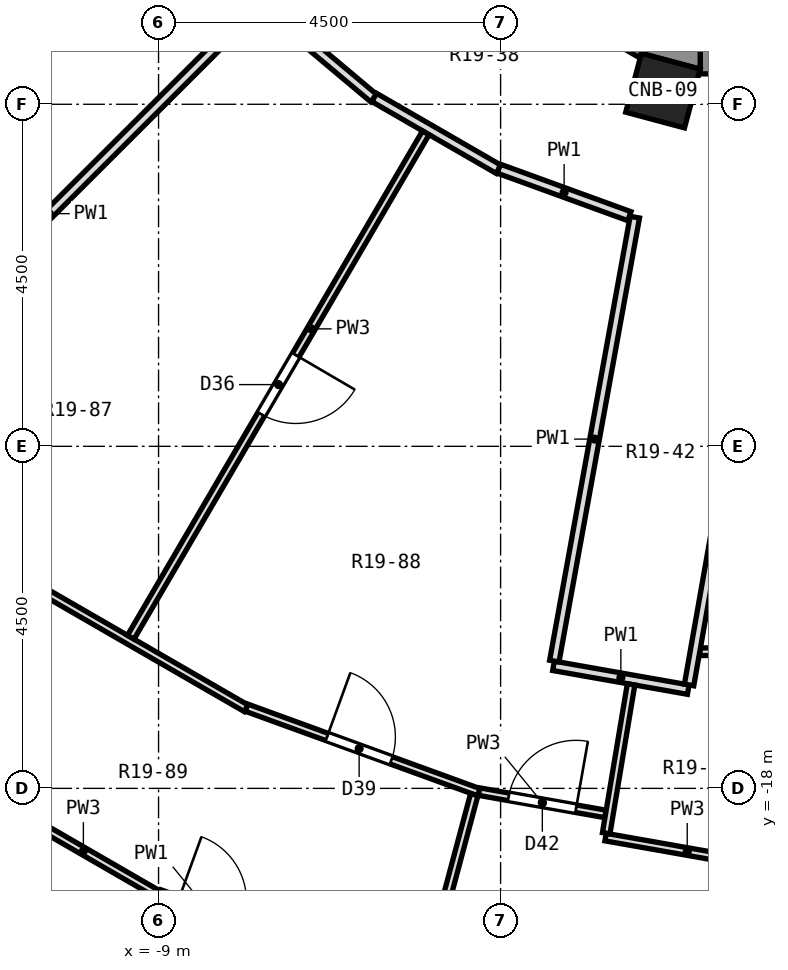
"""IFC4 building model, lengths in metres.
Left out: names, types, materials, properties, quantities, classifications, styles, units other than length and angle.
Written with IfcOpenShell. Run it as: python <this file> out.ifc"""

import sys

from ifc_helpers import new_model, si_unit, direction, frame, frame_2d, origin, origin_2d, place, context, subcontext, project, spatial, polyline, rectangle, outline, extrude, element, fill, save


model = new_model("IFC4")
c1 = context("Model", 3, precision=1e-05, world=origin(), true_north=direction((0.0, 1.0)))
c2 = subcontext(c1, "Body", "Model", "MODEL_VIEW")
j1 = project(units=[si_unit("LENGTHUNIT", "METRE"), si_unit("PLANEANGLEUNIT", "RADIAN")], contexts=[c1])
p1 = place(None, origin())
s1 = spatial("IfcSite", under=j1, at=p1, CompositionType="ELEMENT")
p2 = place(p1, origin())
s2 = spatial("IfcBuilding", under=s1, at=p2, CompositionType="ELEMENT")
p3 = place(p2, frame((0.0, 0.0, 111.7)))
s3 = spatial("IfcBuildingStorey", under=s2, at=p3, CompositionType="ELEMENT", Elevation=111.7)
p4 = place(p3, frame((-2.364, -8.821, 0.0), z_axis=(0.0, 0.0, 1.0), x_axis=(-0.258819045103, -0.965925826289, 0.0)))
e1 = element("IfcColumn", 1, at=p4, inside=s3, PredefinedType="COLUMN", context=c2, shape_type="SweptSolid", body=[
    extrude(rectangle(XDim=0.8, YDim=0.8, at=origin_2d()), origin(), (0.0, 0.0, 1.0), 3.3),
])
p5 = place(p3, frame((-5.773, -6.251, 0.0), z_axis=(0.0, 0.0, 1.0), x_axis=(0.86604563398, -0.499964958637, 0.0)))
e2 = element("IfcWall", 2, at=p5, inside=s3, PredefinedType="SOLIDWALL", context=c2, shape_type="SweptSolid", body=[
    extrude(rectangle(XDim=3.747, YDim=0.6, at=frame_2d((1.874, 0.0))), origin(), (0.0, 0.0, 1.0), 2.8),
])
p6 = place(p5, frame((0.674, 0.0, 0.9)))
e3 = element("IfcOpeningElement", 3, at=p6, cuts=e2, PredefinedType="OPENING", context=c2, shape_type="SweptSolid", body=[
    extrude(rectangle(XDim=2.4, YDim=1.8, at=frame_2d((1.2, 0.9))), frame((0.0, 0.312, 0.0), z_axis=(0.0, -1.0, 0.0), x_axis=(1.0, 0.0, 0.0)), (0.0, 0.0, 1.0), 0.624),
])
p7 = place(p3, frame((-1.874, -8.3, 0.0), z_axis=(0.0, 0.0, 1.0), x_axis=(1.0, 0.0, 0.0)))
e4 = element("IfcWall", 4, at=p7, inside=s3, PredefinedType="SOLIDWALL", context=c2, shape_type="SweptSolid", body=[
    extrude(rectangle(XDim=3.748, YDim=0.6, at=frame_2d((1.874, 0.0))), origin(), (0.0, 0.0, 1.0), 2.8),
])
p8 = place(p7, frame((0.674, 0.0, 0.9)))
e5 = element("IfcOpeningElement", 5, at=p8, cuts=e4, PredefinedType="OPENING", context=c2, shape_type="SweptSolid", body=[
    extrude(rectangle(XDim=2.4, YDim=1.8, at=frame_2d((1.2, 0.9))), frame((0.0, 0.312, 0.0), z_axis=(0.0, -1.0, 0.0), x_axis=(1.0, 0.0, 0.0)), (0.0, 0.0, 1.0), 0.624),
])
p9 = place(p3, origin())
e6 = element("IfcWall", 6, at=p9, inside=s3, PredefinedType="SOLIDWALL", context=c2, shape_type="SweptSolid", body=[
    extrude(outline(polyline([(-1.874, -8.538), (-1.874, -8.0), (-2.377, -7.865), (-2.646, -8.331), (-1.874, -8.538)])), origin(), (0.0, 0.0, 1.0), 2.8),
])
p10 = place(p3, frame((-7.665, -7.664, 0.0), z_axis=(0.0, 0.0, 1.0), x_axis=(0.766086332365, -0.642737684723, 0.0)))
e7 = element("IfcWall", 7, at=p10, inside=s3, PredefinedType="PARTITIONING", context=c2, shape_type="SweptSolid", body=[
    extrude(rectangle(XDim=1.954, YDim=0.125, at=frame_2d((0.977, 0.0))), origin(), (0.0, 0.0, 1.0), 2.8),
])
p11 = place(p3, frame((-10.987, -18.248, 0.0), z_axis=(0.0, 0.0, 1.0), x_axis=(0.865887497708, -0.500238784294, 0.0)))
e8 = element("IfcWall", 8, at=p11, inside=s3, PredefinedType="PARTITIONING", context=c2, shape_type="SweptSolid", body=[
    extrude(rectangle(XDim=2.305, YDim=0.1, at=frame_2d((1.153, 0.0))), origin(), (0.0, 0.0, 1.0), 2.8),
])
p12 = place(p3, frame((-10.666, -15.319, 0.0), z_axis=(0.0, 0.0, 1.0), x_axis=(0.866019502567, -0.500010221068, 0.0)))
e9 = element("IfcWall", 9, at=p12, inside=s3, PredefinedType="PARTITIONING", context=c2, shape_type="SweptSolid", body=[
    extrude(rectangle(XDim=3.256, YDim=0.1, at=frame_2d((1.628, 0.0))), origin(), (0.0, 0.0, 1.0), 2.8),
])
p13 = place(p3, frame((-6.163, -8.91, 0.0), z_axis=(0.0, 0.0, 1.0), x_axis=(0.865856369022, -0.500292662572, 0.0)))
e10 = element("IfcWall", 10, at=p13, inside=s3, PredefinedType="PARTITIONING", context=c2, shape_type="SweptSolid", body=[
    extrude(rectangle(XDim=1.89, YDim=0.125, at=frame_2d((0.945, 0.0))), origin(), (0.0, 0.0, 1.0), 2.8),
])
p14 = place(p3, frame((-8.988, -19.393, 0.0), z_axis=(0.0, 0.0, 1.0), x_axis=(0.939783394235, -0.341770642275, 0.0)))
e11 = element("IfcWall", 11, at=p14, inside=s3, PredefinedType="PARTITIONING", context=c2, shape_type="SweptSolid", body=[
    extrude(rectangle(XDim=1.422, YDim=0.125, at=frame_2d((0.711, 0.0))), origin(), (0.0, 0.0, 1.0), 2.8),
])
p15 = place(p14, frame((0.261, 0.0, 0.0)))
e12 = element("IfcOpeningElement", 12, at=p15, cuts=e11, PredefinedType="OPENING", context=c2, shape_type="SweptSolid", body=[
    extrude(rectangle(XDim=0.9, YDim=2.1, at=frame_2d((0.45, 1.05))), frame((0.0, 0.074, 0.0), z_axis=(0.0, -1.0, 0.0), x_axis=(1.0, 0.0, 0.0)), (0.0, 0.0, 1.0), 0.149),
])
p16 = place(p3, frame((-7.843, -16.938, 0.0), z_axis=(0.0, 0.0, 1.0), x_axis=(0.939697033511, -0.34200801922, 0.0)))
e13 = element("IfcWall", 13, at=p16, inside=s3, PredefinedType="PARTITIONING", context=c2, shape_type="SweptSolid", body=[
    extrude(rectangle(XDim=3.255, YDim=0.1, at=frame_2d((1.627, 0.0))), origin(), (0.0, 0.0, 1.0), 2.8),
])
p17 = place(p16, frame((1.127, 0.0, 0.0)))
e14 = element("IfcOpeningElement", 14, at=p17, cuts=e13, PredefinedType="OPENING", context=c2, shape_type="SweptSolid", body=[
    extrude(rectangle(XDim=0.9, YDim=2.1, at=frame_2d((0.45, 1.05))), frame((0.0, 0.062, 0.0), z_axis=(0.0, -1.0, 0.0), x_axis=(1.0, 0.0, 0.0)), (0.0, 0.0, 1.0), 0.124),
])
p18 = place(p3, frame((-4.523, -9.847, 0.0), z_axis=(0.0, 0.0, 1.0), x_axis=(0.939758316357, -0.341839592261, 0.0)))
e15 = element("IfcWall", 15, at=p18, inside=s3, PredefinedType="PARTITIONING", context=c2, shape_type="SweptSolid", body=[
    extrude(rectangle(XDim=1.828, YDim=0.125, at=frame_2d((0.914, 0.0))), origin(), (0.0, 0.0, 1.0), 2.8),
])
p19 = place(p3, frame((-3.119, -18.641, 0.0), z_axis=(0.0, 0.0, 1.0), x_axis=(0.984804954455, -0.173664048326, 0.0)))
e16 = element("IfcWall", 16, at=p19, inside=s3, PredefinedType="PARTITIONING", context=c2, shape_type="SweptSolid", body=[
    extrude(rectangle(XDim=2.182, YDim=0.1, at=frame_2d((1.091, 0.0))), origin(), (0.0, 0.0, 1.0), 2.8),
])
p20 = place(p3, frame((-4.783, -18.043, 0.0), z_axis=(0.0, 0.0, 1.0), x_axis=(0.98477046178, -0.173859534124, 0.0)))
e17 = element("IfcWall", 17, at=p20, inside=s3, PredefinedType="PARTITIONING", context=c2, shape_type="SweptSolid", body=[
    extrude(rectangle(XDim=1.689, YDim=0.1, at=frame_2d((0.845, 0.0))), origin(), (0.0, 0.0, 1.0), 2.8),
])
p21 = place(p20, frame((0.395, 0.0, 0.0)))
e18 = element("IfcOpeningElement", 18, at=p21, cuts=e17, PredefinedType="OPENING", context=c2, shape_type="SweptSolid", body=[
    extrude(rectangle(XDim=0.9, YDim=2.1, at=frame_2d((0.45, 1.05))), frame((0.0, 0.062, 0.0), z_axis=(0.0, -1.0, 0.0), x_axis=(1.0, 0.0, 0.0)), (0.0, 0.0, 1.0), 0.124),
])
p22 = place(p3, frame((-3.804, -16.388, 0.0), z_axis=(0.0, 0.0, 1.0), x_axis=(0.984772635564, -0.173847220985, 0.0)))
e19 = element("IfcWall", 19, at=p22, inside=s3, PredefinedType="PARTITIONING", context=c2, shape_type="SweptSolid", body=[
    extrude(rectangle(XDim=1.8, YDim=0.125, at=frame_2d((0.9, 0.0))), origin(), (0.0, 0.0, 1.0), 2.8),
])
p23 = place(p3, frame((-1.881, -16.202, 0.0), z_axis=(0.0, 0.0, 1.0), x_axis=(1.0, 0.0, 0.0)))
e20 = element("IfcWall", 20, at=p23, inside=s3, PredefinedType="PARTITIONING", context=c2, shape_type="SweptSolid", body=[
    extrude(rectangle(XDim=1.098, YDim=0.1, at=frame_2d((0.549, 0.0))), origin(), (0.0, 0.0, 1.0), 2.8),
])
p24 = place(p3, frame((-13.167, -13.166, 0.0), z_axis=(0.0, 0.0, 1.0), x_axis=(0.707391477554, 0.706821970148, 0.0)))
e21 = element("IfcWall", 21, at=p24, inside=s3, PredefinedType="PARTITIONING", context=c2, shape_type="SweptSolid", body=[
    extrude(rectangle(XDim=7.716, YDim=0.125, at=frame_2d((3.858, 0.0))), origin(), (0.0, 0.0, 1.0), 2.8),
])
p25 = place(p3, frame((-9.366, -16.012, 0.0), z_axis=(0.0, 0.0, 1.0), x_axis=(0.504907426376, 0.863173499819, 0.0)))
e22 = element("IfcWall", 22, at=p25, inside=s3, PredefinedType="PARTITIONING", context=c2, shape_type="SweptSolid", body=[
    extrude(rectangle(XDim=7.687, YDim=0.1, at=frame_2d((3.843, 0.0))), origin(), (0.0, 0.0, 1.0), 2.8),
])
p26 = place(p25, frame((3.4, 0.0, 0.0)))
e23 = element("IfcOpeningElement", 23, at=p26, cuts=e22, PredefinedType="OPENING", context=c2, shape_type="SweptSolid", body=[
    extrude(rectangle(XDim=0.9, YDim=2.1, at=frame_2d((0.45, 1.05))), frame((0.0, 0.062, 0.0), z_axis=(0.0, -1.0, 0.0), x_axis=(1.0, 0.0, 0.0)), (0.0, 0.0, 1.0), 0.124),
])
p27 = place(p3, frame((-6.642, -24.791, 0.0), z_axis=(0.0, 0.0, 1.0), x_axis=(0.258515851323, 0.966007015821, 0.0)))
e24 = element("IfcWall", 24, at=p27, inside=s3, PredefinedType="PARTITIONING", context=c2, shape_type="SweptSolid", body=[
    extrude(rectangle(XDim=6.945, YDim=0.1, at=frame_2d((3.473, 0.0))), origin(), (0.0, 0.0, 1.0), 2.8),
])
p28 = place(p3, frame((-3.793, -16.325, 0.0), z_axis=(0.0, 0.0, 1.0), x_axis=(0.178389527964, 0.983959946498, 0.0)))
e25 = element("IfcWall", 25, at=p28, inside=s3, PredefinedType="PARTITIONING", context=c2, shape_type="SweptSolid", body=[
    extrude(rectangle(XDim=5.936, YDim=0.125, at=frame_2d((2.968, 0.0))), origin(), (0.0, 0.0, 1.0), 2.8),
])
p29 = place(p3, frame((-2.02, -16.639, 0.0), z_axis=(0.0, 0.0, 1.0), x_axis=(0.17368681293, 0.984800939791, 0.0)))
e26 = element("IfcWall", 26, at=p29, inside=s3, PredefinedType="PARTITIONING", context=c2, shape_type="SweptSolid", body=[
    extrude(rectangle(XDim=5.938, YDim=0.125, at=frame_2d((2.969, 0.0))), origin(), (0.0, 0.0, 1.0), 2.8),
])
p30 = place(p3, frame((-3.111, -18.591, 0.0), z_axis=(0.0, 0.0, 1.0), x_axis=(0.164837501203, 0.986320737994, 0.0)))
e27 = element("IfcWall", 27, at=p30, inside=s3, PredefinedType="PARTITIONING", context=c2, shape_type="SweptSolid", body=[
    extrude(rectangle(XDim=1.986, YDim=0.1, at=frame_2d((0.993, 0.0))), origin(), (0.0, 0.0, 1.0), 2.8),
])
p31 = place(p26, frame((0.9, 0.0, 0.0), z_axis=(0.0, 0.0, 1.0), x_axis=(-1.0, 0.0, 0.0)))
e28 = element("IfcDoor", 28, at=p31, inside=s3, OperationType="SINGLE_SWING_LEFT", PredefinedType="DOOR", context=c2, shape_type="SweptSolid", body=[
    extrude(rectangle(XDim=0.9, YDim=2.1, at=frame_2d((0.45, 1.05))), frame((0.0, 0.025, 0.0), z_axis=(0.0, -1.0, 0.0), x_axis=(1.0, 0.0, 0.0)), (0.0, 0.0, 1.0), 0.05),
])
fill(e23, e28)
p32 = place(p17, origin())
e29 = element("IfcDoor", 29, at=p32, inside=s3, OperationType="SINGLE_SWING_LEFT", PredefinedType="DOOR", context=c2, shape_type="SweptSolid", body=[
    extrude(rectangle(XDim=0.9, YDim=2.1, at=frame_2d((0.45, 1.05))), frame((0.0, 0.025, 0.0), z_axis=(0.0, -1.0, 0.0), x_axis=(1.0, 0.0, 0.0)), (0.0, 0.0, 1.0), 0.05),
])
fill(e14, e29)
p33 = place(p21, origin())
e30 = element("IfcDoor", 30, at=p33, inside=s3, OperationType="SINGLE_SWING_RIGHT", PredefinedType="DOOR", context=c2, shape_type="SweptSolid", body=[
    extrude(rectangle(XDim=0.9, YDim=2.1, at=frame_2d((0.45, 1.05))), frame((0.0, 0.025, 0.0), z_axis=(0.0, -1.0, 0.0), x_axis=(1.0, 0.0, 0.0)), (0.0, 0.0, 1.0), 0.05),
])
fill(e18, e30)
save(model, sys.argv[1])
